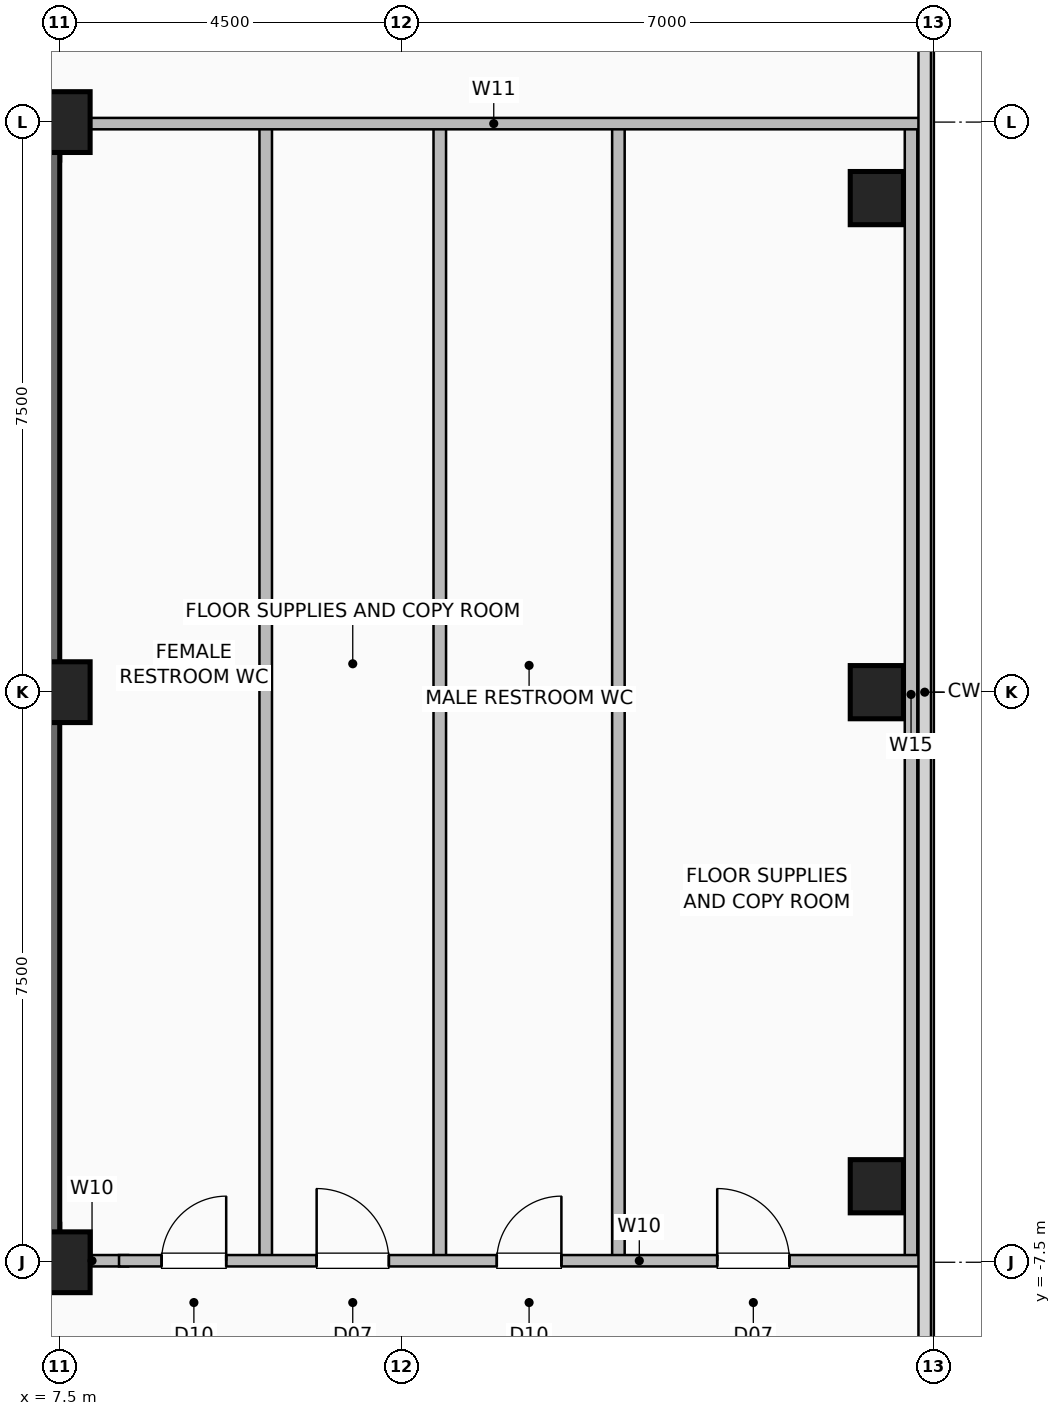
"""IFC4 building model, lengths in metres.
Left out: names, types, materials, properties, quantities, classifications, styles, units other than length and angle.
Written with IfcOpenShell. Run it as: python <this file> out.ifc"""

import sys

from ifc_helpers import new_model, si_unit, direction, frame, frame_2d, origin, origin_2d, place, context, subcontext, project, spatial, rectangle, hollow_rectangle, extrude, element, fill, save


model = new_model("IFC4")
c1 = context("Model", 3, precision=1e-05, world=origin(), true_north=direction((0.0, 1.0)))
c2 = subcontext(c1, "Body", "Model", "MODEL_VIEW")
j1 = project(units=[si_unit("LENGTHUNIT", "METRE"), si_unit("PLANEANGLEUNIT", "RADIAN")], contexts=[c1])
p1 = place(None, origin())
s1 = spatial("IfcSite", under=j1, at=p1, CompositionType="ELEMENT")
p2 = place(p1, origin())
s2 = spatial("IfcBuilding", under=s1, at=p2, CompositionType="ELEMENT")
p3 = place(p2, frame((0.0, 0.0, 275.6)))
s3 = spatial("IfcBuildingStorey", under=s2, at=p3, CompositionType="ELEMENT", Elevation=275.6)
for number, where, z_axis, x_axis in (
    (1, (7.5, -7.5, 0.0), (0.0, 0.0, 1.0), (1.0, 0.0, 0.0)),
    (2, (7.5, 0.0, 0.0), (0.0, 0.0, 1.0), (1.0, 0.0, 0.0)),
    (3, (7.5, 7.5, 0.0), (0.0, 0.0, 1.0), (1.0, 0.0, 0.0)),
):
    element("IfcColumn", number, at=place(p3, frame(where, z_axis=z_axis, x_axis=x_axis)), inside=s3, PredefinedType="COLUMN", context=c2, shape_type="SweptSolid", body=[
        extrude(hollow_rectangle(XDim=0.8, YDim=0.8, WallThickness=0.04, at=origin_2d()), origin(), (0.0, 0.0, 1.0), 3.6),
    ])
for number, where, z_axis, x_axis in (
    (4, (18.25, -6.5, 0.0), (0.0, 0.0, 1.0), (1.0, 0.0, 0.0)),
    (5, (18.25, 0.0, 0.0), (0.0, 0.0, 1.0), (1.0, 0.0, 0.0)),
    (6, (18.25, 6.5, 0.0), (0.0, 0.0, 1.0), (1.0, 0.0, 0.0)),
):
    element("IfcColumn", number, at=place(p3, frame(where, z_axis=z_axis, x_axis=x_axis)), inside=s3, PredefinedType="COLUMN", context=c2, shape_type="SweptSolid", body=[
        extrude(hollow_rectangle(XDim=0.7, YDim=0.7, WallThickness=0.035, at=origin_2d()), origin(), (0.0, 0.0, 1.0), 3.6),
    ])
p4 = place(p3, frame((-7.5, -7.25, 0.0), z_axis=(0.0, 0.0, 1.0), x_axis=(1.0, 0.0, 0.0)))
e7 = element("IfcWall", 7, at=p4, inside=s3, PredefinedType="SHEAR", context=c2, shape_type="SweptSolid", body=[
    extrude(rectangle(XDim=15.0, YDim=0.5, at=frame_2d((7.5, 0.0))), origin(), (0.0, 0.0, 1.0), 3.36),
])
p5 = place(p4, frame((1.55, 0.0, 0.0)))
e8 = element("IfcOpeningElement", 8, at=p5, cuts=e7, PredefinedType="OPENING", context=c2, shape_type="SweptSolid", body=[
    extrude(rectangle(XDim=1.05, YDim=2.08, at=frame_2d((0.525, 1.04))), frame((0.0, 0.26, 0.0), z_axis=(0.0, -1.0, 0.0), x_axis=(1.0, 0.0, 0.0)), (0.0, 0.0, 1.0), 0.52),
])
p6 = place(p4, frame((12.4, 0.0, 0.0)))
e9 = element("IfcOpeningElement", 9, at=p6, cuts=e7, PredefinedType="OPENING", context=c2, shape_type="SweptSolid", body=[
    extrude(rectangle(XDim=1.05, YDim=2.08, at=frame_2d((0.525, 1.04))), frame((0.0, 0.26, 0.0), z_axis=(0.0, -1.0, 0.0), x_axis=(1.0, 0.0, 0.0)), (0.0, 0.0, 1.0), 0.52),
])
p7 = place(p4, frame((5.2, 0.0, 0.0)))
e10 = element("IfcOpeningElement", 10, at=p7, cuts=e7, PredefinedType="OPENING", context=c2, shape_type="SweptSolid", body=[
    extrude(rectangle(XDim=1.0, YDim=2.08, at=frame_2d((0.5, 1.04))), frame((0.0, 0.26, 0.0), z_axis=(0.0, -1.0, 0.0), x_axis=(1.0, 0.0, 0.0)), (0.0, 0.0, 1.0), 0.52),
])
p8 = place(p4, frame((8.65, 0.0, 0.0)))
e11 = element("IfcOpeningElement", 11, at=p8, cuts=e7, PredefinedType="OPENING", context=c2, shape_type="SweptSolid", body=[
    extrude(rectangle(XDim=1.0, YDim=2.08, at=frame_2d((0.5, 1.04))), frame((0.0, 0.26, 0.0), z_axis=(0.0, -1.0, 0.0), x_axis=(1.0, 0.0, 0.0)), (0.0, 0.0, 1.0), 0.52),
])
for number, where, z_axis, x_axis in (
    (12, (-7.5, 7.25, 0.0), (0.0, 0.0, 1.0), (1.0, 0.0, 0.0)),
    (13, (7.25, -7.5, 0.0), (0.0, 0.0, 1.0), (0.0, 1.0, 0.0)),
):
    element("IfcWall", number, at=place(p3, frame(where, z_axis=z_axis, x_axis=x_axis)), inside=s3, PredefinedType="SHEAR", context=c2, shape_type="SweptSolid", body=[
        extrude(rectangle(XDim=15.0, YDim=0.5, at=frame_2d((7.5, 0.0))), origin(), (0.0, 0.0, 1.0), 3.36),
    ])
p9 = place(p3, frame((7.45, -7.48, 0.0), z_axis=(0.0, 0.0, 1.0), x_axis=(1.0, 0.0, 0.0)))
e14 = element("IfcWall", 14, at=p9, inside=s3, PredefinedType="PARTITIONING", context=c2, shape_type="SweptSolid", body=[
    extrude(rectangle(XDim=0.95, YDim=0.15, at=frame_2d((0.475, 0.0))), origin(), (0.0, 0.0, 1.0), 3.36),
])
for number, where, z_axis, x_axis in (
    (15, (10.21, -7.48, 0.0), (0.0, 0.0, 1.0), (0.0, 1.0, 0.0)),
    (16, (14.85, -7.48, 0.0), (0.0, 0.0, 1.0), (0.0, 1.0, 0.0)),
    (17, (12.5, -7.48, 0.0), (0.0, 0.0, 1.0), (0.0, 1.0, 0.0)),
    (18, (18.7, -7.48, 0.0), (0.0, 0.0, 1.0), (0.0, 1.0, 0.0)),
):
    element("IfcWall", number, at=place(p3, frame(where, z_axis=z_axis, x_axis=x_axis)), inside=s3, PredefinedType="PLUMBINGWALL", context=c2, shape_type="SweptSolid", body=[
        extrude(rectangle(XDim=14.9, YDim=0.165, at=frame_2d((7.45, 0.0))), origin(), (0.0, 0.0, 1.0), 3.36),
    ])
p10 = place(p3, frame((8.28, -7.48, 0.0), z_axis=(0.0, 0.0, 1.0), x_axis=(1.0, 0.0, 0.0)))
e19 = element("IfcWall", 19, at=p10, inside=s3, PredefinedType="PARTITIONING", context=c2, shape_type="SweptSolid", body=[
    extrude(rectangle(XDim=10.54, YDim=0.15, at=frame_2d((5.27, 0.0))), origin(), (0.0, 0.0, 1.0), 3.36),
])
p11 = place(p10, frame((0.56, 0.0, 0.0)))
e20 = element("IfcOpeningElement", 20, at=p11, cuts=e19, PredefinedType="OPENING", context=c2, shape_type="SweptSolid", body=[
    extrude(rectangle(XDim=0.85, YDim=2.05, at=frame_2d((0.425, 1.025))), frame((0.0, 0.085, 0.0), z_axis=(0.0, -1.0, 0.0), x_axis=(1.0, 0.0, 0.0)), (0.0, 0.0, 1.0), 0.17),
])
p12 = place(p10, frame((2.6, 0.0, 0.0)))
e21 = element("IfcOpeningElement", 21, at=p12, cuts=e19, PredefinedType="OPENING", context=c2, shape_type="SweptSolid", body=[
    extrude(rectangle(XDim=0.95, YDim=2.06, at=frame_2d((0.475, 1.03))), frame((0.0, 0.085, 0.0), z_axis=(0.0, -1.0, 0.0), x_axis=(1.0, 0.0, 0.0)), (0.0, 0.0, 1.0), 0.17),
])
p13 = place(p10, frame((4.97, 0.0, 0.0)))
e22 = element("IfcOpeningElement", 22, at=p13, cuts=e19, PredefinedType="OPENING", context=c2, shape_type="SweptSolid", body=[
    extrude(rectangle(XDim=0.85, YDim=2.05, at=frame_2d((0.425, 1.025))), frame((0.0, 0.085, 0.0), z_axis=(0.0, -1.0, 0.0), x_axis=(1.0, 0.0, 0.0)), (0.0, 0.0, 1.0), 0.17),
])
p14 = place(p10, frame((7.87, 0.0, 0.0)))
e23 = element("IfcOpeningElement", 23, at=p14, cuts=e19, PredefinedType="OPENING", context=c2, shape_type="SweptSolid", body=[
    extrude(rectangle(XDim=0.95, YDim=2.06, at=frame_2d((0.475, 1.03))), frame((0.0, 0.085, 0.0), z_axis=(0.0, -1.0, 0.0), x_axis=(1.0, 0.0, 0.0)), (0.0, 0.0, 1.0), 0.17),
])
p15 = place(p3, frame((7.6, 7.48, 0.0), z_axis=(0.0, 0.0, 1.0), x_axis=(1.0, 0.0, 0.0)))
e24 = element("IfcWall", 24, at=p15, inside=s3, PredefinedType="PARTITIONING", context=c2, shape_type="SweptSolid", body=[
    extrude(rectangle(XDim=11.22, YDim=0.15, at=frame_2d((5.61, 0.0))), origin(), (0.0, 0.0, 1.0), 3.36),
])
p16 = place(p11, origin())
e25 = element("IfcDoor", 25, at=p16, inside=s3, OperationType="SINGLE_SWING_RIGHT", PredefinedType="DOOR", context=c2, shape_type="SweptSolid", body=[
    extrude(rectangle(XDim=0.85, YDim=2.05, at=frame_2d((0.425, 1.025))), frame((0.0, 0.025, 0.0), z_axis=(0.0, -1.0, 0.0), x_axis=(1.0, 0.0, 0.0)), (0.0, 0.0, 1.0), 0.05),
])
fill(e20, e25)
p17 = place(p12, origin())
e26 = element("IfcDoor", 26, at=p17, inside=s3, OperationType="SINGLE_SWING_LEFT", PredefinedType="DOOR", context=c2, shape_type="SweptSolid", body=[
    extrude(rectangle(XDim=0.95, YDim=2.06, at=frame_2d((0.475, 1.03))), frame((0.0, 0.025, 0.0), z_axis=(0.0, -1.0, 0.0), x_axis=(1.0, 0.0, 0.0)), (0.0, 0.0, 1.0), 0.05),
])
fill(e21, e26)
p18 = place(p13, origin())
e27 = element("IfcDoor", 27, at=p18, inside=s3, OperationType="SINGLE_SWING_RIGHT", PredefinedType="DOOR", context=c2, shape_type="SweptSolid", body=[
    extrude(rectangle(XDim=0.85, YDim=2.05, at=frame_2d((0.425, 1.025))), frame((0.0, 0.025, 0.0), z_axis=(0.0, -1.0, 0.0), x_axis=(1.0, 0.0, 0.0)), (0.0, 0.0, 1.0), 0.05),
])
fill(e22, e27)
p19 = place(p14, origin())
e28 = element("IfcDoor", 28, at=p19, inside=s3, OperationType="SINGLE_SWING_LEFT", PredefinedType="DOOR", context=c2, shape_type="SweptSolid", body=[
    extrude(rectangle(XDim=0.95, YDim=2.06, at=frame_2d((0.475, 1.03))), frame((0.0, 0.025, 0.0), z_axis=(0.0, -1.0, 0.0), x_axis=(1.0, 0.0, 0.0)), (0.0, 0.0, 1.0), 0.05),
])
fill(e23, e28)
save(model, sys.argv[1])
